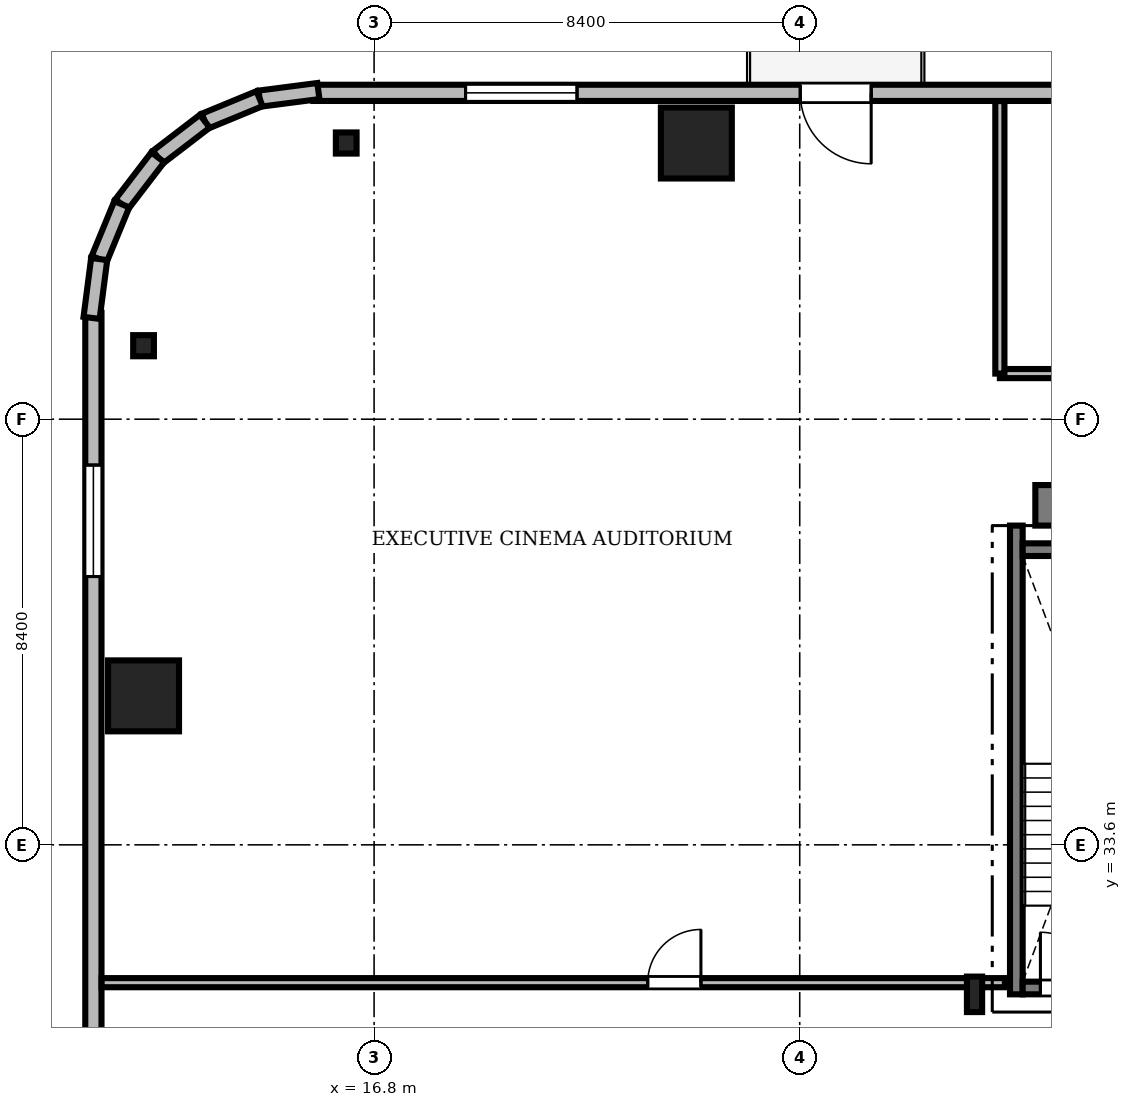
"""IFC4 building model, lengths in metres.
Left out: names, types, materials, properties, quantities, classifications, styles, units other than length and angle.
Written with IfcOpenShell. Run it as: python <this file> out.ifc"""

import sys

from ifc_helpers import new_model, si_unit, direction, frame, frame_2d, origin, origin_2d, place, context, subcontext, project, spatial, rectangle, i_section, extrude, source, transform, mapped, element, fill, save


model = new_model("IFC4")
c1 = context("Model", 3, precision=1e-05, world=origin(), true_north=direction((0.0, 1.0)))
c2 = subcontext(c1, "Body", "Model", "MODEL_VIEW")
j1 = project(units=[si_unit("LENGTHUNIT", "METRE"), si_unit("PLANEANGLEUNIT", "RADIAN")], contexts=[c1])
p1 = place(None, origin())
s1 = spatial("IfcSite", under=j1, at=p1, CompositionType="ELEMENT")
p2 = place(p1, origin())
s2 = spatial("IfcBuilding", under=s1, at=p2, CompositionType="ELEMENT")
p3 = place(p2, frame((0.0, 0.0, 214.8)))
s3 = spatial("IfcBuildingStorey", under=s2, at=p3, CompositionType="ELEMENT", Elevation=214.8)
m1 = source(origin(), c2, "Body", "SweptSolid", [
    extrude(rectangle(XDim=17.52, YDim=0.8, at=frame_2d((8.76, 0.0))), origin(), (0.0, 0.0, 1.0), 3.53),
])
p4 = place(p3, frame((29.85, 40.3, 0.0), z_axis=(0.0, 0.0, 1.0), x_axis=(1.0, 0.0, 0.0)))
e1 = element("IfcWall", 1, at=p4, inside=s3, PredefinedType="SHEAR", context=c2, shape_type="MappedRepresentation", body=[
    mapped(m1, transform((0.0, 0.0, 0.0), scale=1.0)),
])
m2 = source(origin(), c2, "Body", "SweptSolid", [
    extrude(i_section(OverallWidth=0.3, OverallDepth=0.7, WebThickness=0.017, FlangeThickness=0.032, FilletRadius=0.027, at=origin_2d()), origin(), (0.0, 0.0, 1.0), 3.53),
])
p5 = place(p3, frame((28.65, 30.65, 0.0), z_axis=(0.0, 0.0, 1.0), x_axis=(1.0, 0.0, 0.0)))
e2 = element("IfcColumn", 2, at=p5, inside=s3, PredefinedType="COLUMN", context=c2, shape_type="MappedRepresentation", body=[
    mapped(m2, transform((0.0, 0.0, 0.0), scale=1.0)),
])
m3 = source(origin(), c2, "Body", "SweptSolid", [
    extrude(rectangle(XDim=1.4, YDim=1.4, at=origin_2d()), origin(), (0.0, 0.0, 1.0), 3.53),
])
for number, where, z_axis, x_axis in (
    (3, (23.16, 47.45, 0.0), (0.0, 0.0, 1.0), (1.0, 0.0, 0.0)),
    (4, (12.25, 36.54, 0.0), (0.0, 0.0, 1.0), (1.0, 0.0, 0.0)),
):
    element("IfcColumn", number, at=place(p3, frame(where, z_axis=z_axis, x_axis=x_axis)), inside=s3, PredefinedType="COLUMN", context=c2, shape_type="MappedRepresentation", body=[
        mapped(m3, transform((0.0, 0.0, 0.0), scale=1.0)),
    ])
m4 = source(origin(), c2, "Body", "SweptSolid", [
    extrude(i_section(OverallWidth=0.409, OverallDepth=0.417, WebThickness=0.021, FlangeThickness=0.033, FilletRadius=0.015, at=origin_2d()), origin(), (0.0, 0.0, 1.0), 3.53),
])
for number, where, z_axis, x_axis in (
    (5, (16.25, 47.45, 0.0), (0.0, 0.0, 1.0), (1.0, 0.0, 0.0)),
    (6, (12.25, 43.45, 0.0), (0.0, 0.0, 1.0), (1.0, 0.0, 0.0)),
):
    element("IfcColumn", number, at=place(p3, frame(where, z_axis=z_axis, x_axis=x_axis)), inside=s3, PredefinedType="COLUMN", context=c2, shape_type="MappedRepresentation", body=[
        mapped(m4, transform((0.0, 0.0, 0.0), scale=1.0)),
    ])
m5 = source(origin(), c2, "Body", "SweptSolid", [
    extrude(rectangle(XDim=15.6, YDim=0.32, at=frame_2d((7.8, 0.0))), origin(), (0.0, 0.0, 1.0), 3.53),
])
p6 = place(p3, frame((31.2, 48.44, 0.0), z_axis=(0.0, 0.0, 1.0), x_axis=(-1.0, 0.0, 0.0)))
e7 = element("IfcWall", 7, at=p6, inside=s3, PredefinedType="SOLIDWALL", context=c2, shape_type="MappedRepresentation", body=[
    mapped(m5, transform((0.0, 0.0, 0.0), scale=1.0)),
])
m6 = source(origin(), c2, "Body", "SweptSolid", [
    extrude(rectangle(XDim=1.4, YDim=2.3, at=frame_2d((0.7, 1.15))), frame((0.0, 0.17, 0.0), z_axis=(0.0, -1.0, 0.0), x_axis=(1.0, 0.0, 0.0)), (0.0, 0.0, 1.0), 0.34),
])
p7 = place(p6, frame((4.59, 0.0, 0.0)))
e8 = element("IfcOpeningElement", 8, at=p7, cuts=e7, PredefinedType="OPENING", context=c2, shape_type="MappedRepresentation", body=[
    mapped(m6, transform((0.0, 0.0, 0.0), scale=1.0)),
])
m7 = source(origin(), c2, "Body", "SweptSolid", [
    extrude(rectangle(XDim=2.2, YDim=2.4, at=frame_2d((1.1, 1.2))), frame((0.0, 0.17, 0.0), z_axis=(0.0, -1.0, 0.0), x_axis=(1.0, 0.0, 0.0)), (0.0, 0.0, 1.0), 0.34),
])
p8 = place(p6, frame((10.395, 0.0, 0.72)))
e9 = element("IfcOpeningElement", 9, at=p8, cuts=e7, PredefinedType="OPENING", context=c2, shape_type="MappedRepresentation", body=[
    mapped(m7, transform((0.0, 0.0, 0.0), scale=1.0)),
])
m8 = source(origin(), c2, "Body", "SweptSolid", [
    extrude(rectangle(XDim=15.6, YDim=0.32, at=frame_2d((7.8, 0.0))), origin(), (0.0, 0.0, 1.0), 3.53),
])
p9 = place(p3, frame((11.26, 44.1, 0.0), z_axis=(0.0, 0.0, 1.0), x_axis=(0.0, -1.0, 0.0)))
e10 = element("IfcWall", 10, at=p9, inside=s3, PredefinedType="SOLIDWALL", context=c2, shape_type="MappedRepresentation", body=[
    mapped(m8, transform((0.0, 0.0, 0.0), scale=1.0)),
])
p10 = place(p9, frame((3.005, 0.0, 0.72)))
e11 = element("IfcOpeningElement", 11, at=p10, cuts=e10, PredefinedType="OPENING", context=c2, shape_type="MappedRepresentation", body=[
    mapped(m7, transform((0.0, 0.0, 0.0), scale=1.0)),
])
m9 = source(origin(), c2, "Body", "SweptSolid", [
    extrude(rectangle(XDim=1.17, YDim=0.32, at=frame_2d((0.585, 0.0))), origin(), (0.0, 0.0, 1.0), 3.53),
])
p11 = place(p3, frame((15.7, 48.476, 0.0), z_axis=(0.0, 0.0, 1.0), x_axis=(-0.991735963317, -0.128295670475, 0.0)))
e12 = element("IfcWall", 12, at=p11, inside=s3, PredefinedType="SOLIDWALL", context=c2, shape_type="MappedRepresentation", body=[
    mapped(m9, transform((0.0, 0.0, 0.0), scale=1.0)),
])
m10 = source(origin(), c2, "Body", "SweptSolid", [
    extrude(rectangle(XDim=1.169, YDim=0.32, at=frame_2d((0.584, 0.0))), origin(), (0.0, 0.0, 1.0), 3.53),
])
p12 = place(p3, frame((14.54, 48.325, 0.0), z_axis=(0.0, 0.0, 1.0), x_axis=(-0.924552646638, -0.381054331552, 0.0)))
e13 = element("IfcWall", 13, at=p12, inside=s3, PredefinedType="SOLIDWALL", context=c2, shape_type="MappedRepresentation", body=[
    mapped(m10, transform((0.0, 0.0, 0.0), scale=1.0)),
])
m11 = source(origin(), c2, "Body", "SweptSolid", [
    extrude(rectangle(XDim=1.169, YDim=0.32, at=frame_2d((0.584, 0.0))), origin(), (0.0, 0.0, 1.0), 3.53),
])
p13 = place(p3, frame((13.459, 47.88, 0.0), z_axis=(0.0, 0.0, 1.0), x_axis=(-0.793663520347, -0.608356981114, 0.0)))
e14 = element("IfcWall", 14, at=p13, inside=s3, PredefinedType="SOLIDWALL", context=c2, shape_type="MappedRepresentation", body=[
    mapped(m11, transform((0.0, 0.0, 0.0), scale=1.0)),
])
m12 = source(origin(), c2, "Body", "SweptSolid", [
    extrude(rectangle(XDim=1.169, YDim=0.32, at=frame_2d((0.584, 0.0))), origin(), (0.0, 0.0, 1.0), 3.53),
])
p14 = place(p3, frame((12.531, 47.169, 0.0), z_axis=(0.0, 0.0, 1.0), x_axis=(-0.608387696831, -0.793639975269, 0.0)))
e15 = element("IfcWall", 15, at=p14, inside=s3, PredefinedType="SOLIDWALL", context=c2, shape_type="MappedRepresentation", body=[
    mapped(m12, transform((0.0, 0.0, 0.0), scale=1.0)),
])
p15 = place(p3, frame((11.82, 46.241, 0.0), z_axis=(0.0, 0.0, 1.0), x_axis=(-0.381054331552, -0.924552646638, 0.0)))
e16 = element("IfcWall", 16, at=p15, inside=s3, PredefinedType="SOLIDWALL", context=c2, shape_type="MappedRepresentation", body=[
    mapped(m10, transform((0.0, 0.0, 0.0), scale=1.0)),
])
p16 = place(p3, frame((11.375, 45.16, 0.0), z_axis=(0.0, 0.0, 1.0), x_axis=(-0.128295670475, -0.991735963317, 0.0)))
e17 = element("IfcWall", 17, at=p16, inside=s3, PredefinedType="SOLIDWALL", context=c2, shape_type="MappedRepresentation", body=[
    mapped(m9, transform((0.0, 0.0, 0.0), scale=1.0)),
])
m13 = source(origin(), c2, "Body", "SweptSolid", [
    extrude(rectangle(XDim=9.25, YDim=0.25, at=frame_2d((4.625, 0.0))), origin(), (0.0, 0.0, 1.0), 3.55),
])
p17 = place(p3, frame((29.475, 30.65, 0.0), z_axis=(0.0, 0.0, 1.0), x_axis=(0.0, 1.0, 0.0)))
e18 = element("IfcWall", 18, at=p17, inside=s3, PredefinedType="SOLIDWALL", context=c2, shape_type="MappedRepresentation", body=[
    mapped(m13, transform((0.0, 0.0, 0.0), scale=1.0)),
])
m14 = source(origin(), c2, "Body", "SweptSolid", [
    extrude(rectangle(XDim=3.15, YDim=0.25, at=frame_2d((1.575, 0.0))), origin(), (0.0, 0.0, 1.0), 3.55),
])
p18 = place(p3, frame((29.6, 39.425, 0.0), z_axis=(0.0, 0.0, 1.0), x_axis=(1.0, 0.0, 0.0)))
e19 = element("IfcWall", 19, at=p18, inside=s3, PredefinedType="SOLIDWALL", context=c2, shape_type="MappedRepresentation", body=[
    mapped(m14, transform((0.0, 0.0, 0.0), scale=1.0)),
])
p19 = place(p3, frame((29.6, 30.775, 0.0), z_axis=(0.0, 0.0, 1.0), x_axis=(1.0, 0.0, 0.0)))
e20 = element("IfcWall", 20, at=p19, inside=s3, PredefinedType="SOLIDWALL", context=c2, shape_type="MappedRepresentation", body=[
    mapped(m14, transform((0.0, 0.0, 0.0), scale=1.0)),
])
m15 = source(origin(), c2, "Body", "SweptSolid", [
    extrude(rectangle(XDim=1.1, YDim=2.2, at=frame_2d((0.55, 1.1))), frame((0.0, 0.135, 0.0), z_axis=(0.0, -1.0, 0.0), x_axis=(1.0, 0.0, 0.0)), (0.0, 0.0, 1.0), 0.27),
])
p20 = place(p19, frame((0.35, 0.0, 0.0)))
e21 = element("IfcOpeningElement", 21, at=p20, cuts=e20, PredefinedType="OPENING", context=c2, shape_type="MappedRepresentation", body=[
    mapped(m15, transform((0.0, 0.0, 0.0), scale=1.0)),
])
m16 = source(origin(), c2, "Body", "SweptSolid", [
    extrude(rectangle(XDim=28.428, YDim=0.18, at=frame_2d((14.214, 0.0))), origin(), (0.0, 0.0, 1.0), 2.772),
])
p21 = place(p3, frame((29.15, 42.9, 0.0), z_axis=(0.0, 0.0, 1.0), x_axis=(1.0, 0.0, 0.0)))
e22 = element("IfcWall", 22, at=p21, inside=s3, PredefinedType="PARTITIONING", context=c2, shape_type="MappedRepresentation", body=[
    mapped(m16, transform((0.0, 0.0, 0.0), scale=1.0)),
])
m17 = source(origin(), c2, "Body", "SweptSolid", [
    extrude(rectangle(XDim=1.05, YDim=2.2, at=frame_2d((0.525, 1.1))), frame((0.0, 0.1, 0.0), z_axis=(0.0, -1.0, 0.0), x_axis=(1.0, 0.0, 0.0)), (0.0, 0.0, 1.0), 0.2),
])
p22 = place(p21, frame((4.5, 0.0, 0.0)))
e23 = element("IfcOpeningElement", 23, at=p22, cuts=e22, PredefinedType="OPENING", context=c2, shape_type="MappedRepresentation", body=[
    mapped(m17, transform((0.0, 0.0, 0.0), scale=1.0)),
])
m18 = source(origin(), c2, "Body", "SweptSolid", [
    extrude(rectangle(XDim=17.828, YDim=0.18, at=frame_2d((8.914, 0.0))), origin(), (0.0, 0.0, 1.0), 2.772),
])
p23 = place(p3, frame((11.422, 30.88, 0.0), z_axis=(0.0, 0.0, 1.0), x_axis=(1.0, 0.0, 0.0)))
e24 = element("IfcWall", 24, at=p23, inside=s3, PredefinedType="PARTITIONING", context=c2, shape_type="MappedRepresentation", body=[
    mapped(m18, transform((0.0, 0.0, 0.0), scale=1.0)),
])
p24 = place(p23, frame((10.778, 0.0, 0.0)))
e25 = element("IfcOpeningElement", 25, at=p24, cuts=e24, PredefinedType="OPENING", context=c2, shape_type="MappedRepresentation", body=[
    mapped(m17, transform((0.0, 0.0, 0.0), scale=1.0)),
])
m19 = source(origin(), c2, "Body", "SweptSolid", [
    extrude(rectangle(XDim=5.378, YDim=0.18, at=frame_2d((2.689, 0.0))), origin(), (0.0, 0.0, 1.0), 2.772),
])
p25 = place(p3, frame((29.15, 42.9, 0.0), z_axis=(0.0, 0.0, 1.0), x_axis=(0.0, 1.0, 0.0)))
e26 = element("IfcWall", 26, at=p25, inside=s3, PredefinedType="PARTITIONING", context=c2, shape_type="MappedRepresentation", body=[
    mapped(m19, transform((0.0, 0.0, 0.0), scale=1.0)),
])
m20 = source(origin(), c2, "Body", "SweptSolid", [
    extrude(rectangle(XDim=1.4, YDim=2.3, at=frame_2d((0.7, 1.15))), frame((0.0, 0.025, 0.0), z_axis=(0.0, -1.0, 0.0), x_axis=(1.0, 0.0, 0.0)), (0.0, 0.0, 1.0), 0.05),
])
p26 = place(p7, frame((1.4, 0.0, 0.0), z_axis=(0.0, 0.0, 1.0), x_axis=(-1.0, 0.0, 0.0)))
e27 = element("IfcDoor", 27, at=p26, inside=s3, OperationType="DOUBLE_DOOR_SLIDING", PredefinedType="DOOR", context=c2, shape_type="MappedRepresentation", body=[
    mapped(m20, transform((0.0, 0.0, 0.0), scale=1.0)),
])
fill(e8, e27)
m21 = source(origin(), c2, "Body", "SweptSolid", [
    extrude(rectangle(XDim=2.2, YDim=2.4, at=frame_2d((1.1, 1.2))), frame((0.0, 0.03, 0.0), z_axis=(0.0, -1.0, 0.0), x_axis=(1.0, 0.0, 0.0)), (0.0, 0.0, 1.0), 0.06),
])
p27 = place(p8, origin())
e28 = element("IfcWindow", 28, at=p27, inside=s3, PartitioningType="SINGLE_PANEL", PredefinedType="WINDOW", context=c2, shape_type="MappedRepresentation", body=[
    mapped(m21, transform((0.0, 0.0, 0.0), scale=1.0)),
])
fill(e9, e28)
p28 = place(p10, origin())
e29 = element("IfcWindow", 29, at=p28, inside=s3, PartitioningType="SINGLE_PANEL", PredefinedType="WINDOW", context=c2, shape_type="MappedRepresentation", body=[
    mapped(m21, transform((0.0, 0.0, 0.0), scale=1.0)),
])
fill(e11, e29)
m22 = source(origin(), c2, "Body", "SweptSolid", [
    extrude(rectangle(XDim=1.1, YDim=2.2, at=frame_2d((0.55, 1.1))), frame((0.0, 0.025, 0.0), z_axis=(0.0, -1.0, 0.0), x_axis=(1.0, 0.0, 0.0)), (0.0, 0.0, 1.0), 0.05),
])
p29 = place(p20, origin())
e30 = element("IfcDoor", 30, at=p29, inside=s3, OperationType="SINGLE_SWING_LEFT", PredefinedType="DOOR", context=c2, shape_type="MappedRepresentation", body=[
    mapped(m22, transform((0.0, 0.0, 0.0), scale=1.0)),
])
fill(e21, e30)
m23 = source(origin(), c2, "Body", "SweptSolid", [
    extrude(rectangle(XDim=1.05, YDim=2.2, at=frame_2d((0.525, 1.1))), frame((0.0, 0.025, 0.0), z_axis=(0.0, -1.0, 0.0), x_axis=(1.0, 0.0, 0.0)), (0.0, 0.0, 1.0), 0.05),
])
p30 = place(p24, origin())
e31 = element("IfcDoor", 31, at=p30, inside=s3, OperationType="SINGLE_SWING_RIGHT", PredefinedType="DOOR", context=c2, shape_type="MappedRepresentation", body=[
    mapped(m23, transform((0.0, 0.0, 0.0), scale=1.0)),
])
fill(e25, e31)
save(model, sys.argv[1])
